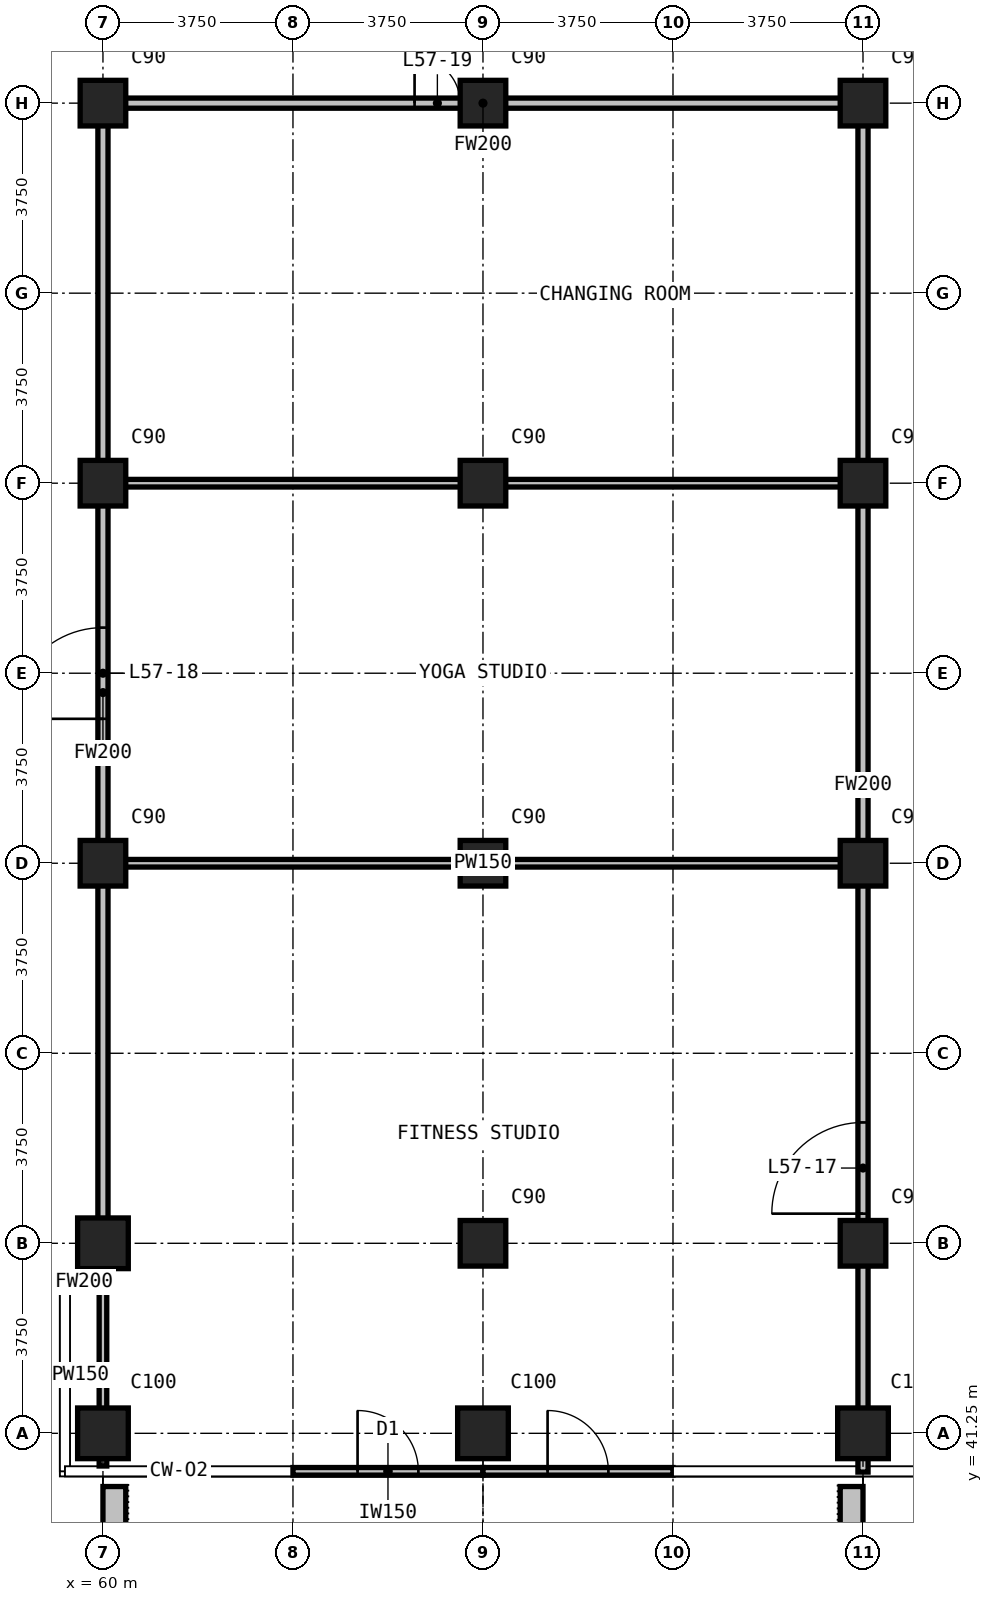
"""IFC4 building model, lengths in metres.
Left out: names, types, materials, properties, quantities, classifications, styles, units other than length and angle.
Written with IfcOpenShell. Run it as: python <this file> out.ifc"""

import sys

from ifc_helpers import new_model, si_unit, direction, frame, frame_2d, origin, origin_2d, place, context, subcontext, project, spatial, rectangle, extrude, element, fill, save


model = new_model("IFC4")
c1 = context("Model", 3, precision=1e-05, world=origin(), true_north=direction((0.0, 1.0)))
c2 = subcontext(c1, "Body", "Model", "MODEL_VIEW")
j1 = project(units=[si_unit("LENGTHUNIT", "METRE"), si_unit("PLANEANGLEUNIT", "RADIAN")], contexts=[c1])
p1 = place(None, origin())
s1 = spatial("IfcSite", under=j1, at=p1, CompositionType="ELEMENT")
p2 = place(p1, origin())
s2 = spatial("IfcBuilding", under=s1, at=p2, CompositionType="ELEMENT")
p3 = place(p2, frame((0.0, 0.0, 221.1)))
s3 = spatial("IfcBuildingStorey", under=s2, at=p3, CompositionType="ELEMENT", Elevation=221.1)
for number, where, z_axis, x_axis in (
    (1, (60.0, 41.25, 0.0), (0.0, 0.0, 1.0), (1.0, 0.0, 0.0)),
    (2, (60.0, 45.0, 0.0), (0.0, 0.0, 1.0), (1.0, 0.0, 0.0)),
):
    element("IfcColumn", number, at=place(p3, frame(where, z_axis=z_axis, x_axis=x_axis)), inside=s3, PredefinedType="COLUMN", context=c2, shape_type="SweptSolid", body=[
        extrude(rectangle(XDim=1.0, YDim=1.0, at=origin_2d()), origin(), (0.0, 0.0, 1.0), 3.6),
    ])
for number, where, z_axis, x_axis in (
    (3, (60.0, 52.5, 0.0), (0.0, 0.0, 1.0), (1.0, 0.0, 0.0)),
    (4, (60.0, 60.0, 0.0), (0.0, 0.0, 1.0), (1.0, 0.0, 0.0)),
    (5, (60.0, 67.5, 0.0), (0.0, 0.0, 1.0), (1.0, 0.0, 0.0)),
):
    element("IfcColumn", number, at=place(p3, frame(where, z_axis=z_axis, x_axis=x_axis)), inside=s3, PredefinedType="COLUMN", context=c2, shape_type="SweptSolid", body=[
        extrude(rectangle(XDim=0.9, YDim=0.9, at=origin_2d()), origin(), (0.0, 0.0, 1.0), 3.6),
    ])
p4 = place(p3, frame((67.5, 41.25, 0.0), z_axis=(0.0, 0.0, 1.0), x_axis=(1.0, 0.0, 0.0)))
e6 = element("IfcColumn", 6, at=p4, inside=s3, PredefinedType="COLUMN", context=c2, shape_type="SweptSolid", body=[
    extrude(rectangle(XDim=1.0, YDim=1.0, at=origin_2d()), origin(), (0.0, 0.0, 1.0), 3.6),
])
for number, where, z_axis, x_axis in (
    (7, (67.5, 45.0, 0.0), (0.0, 0.0, 1.0), (1.0, 0.0, 0.0)),
    (8, (67.5, 52.5, 0.0), (0.0, 0.0, 1.0), (1.0, 0.0, 0.0)),
    (9, (67.5, 60.0, 0.0), (0.0, 0.0, 1.0), (1.0, 0.0, 0.0)),
    (10, (67.5, 67.5, 0.0), (0.0, 0.0, 1.0), (1.0, 0.0, 0.0)),
):
    element("IfcColumn", number, at=place(p3, frame(where, z_axis=z_axis, x_axis=x_axis)), inside=s3, PredefinedType="COLUMN", context=c2, shape_type="SweptSolid", body=[
        extrude(rectangle(XDim=0.9, YDim=0.9, at=origin_2d()), origin(), (0.0, 0.0, 1.0), 3.6),
    ])
p5 = place(p3, frame((75.0, 41.25, 0.0), z_axis=(0.0, 0.0, 1.0), x_axis=(1.0, 0.0, 0.0)))
e11 = element("IfcColumn", 11, at=p5, inside=s3, PredefinedType="COLUMN", context=c2, shape_type="SweptSolid", body=[
    extrude(rectangle(XDim=1.0, YDim=1.0, at=origin_2d()), origin(), (0.0, 0.0, 1.0), 3.6),
])
for number, where, z_axis, x_axis in (
    (12, (75.0, 45.0, 0.0), (0.0, 0.0, 1.0), (1.0, 0.0, 0.0)),
    (13, (75.0, 52.5, 0.0), (0.0, 0.0, 1.0), (1.0, 0.0, 0.0)),
    (14, (75.0, 60.0, 0.0), (0.0, 0.0, 1.0), (1.0, 0.0, 0.0)),
    (15, (75.0, 67.5, 0.0), (0.0, 0.0, 1.0), (1.0, 0.0, 0.0)),
):
    element("IfcColumn", number, at=place(p3, frame(where, z_axis=z_axis, x_axis=x_axis)), inside=s3, PredefinedType="COLUMN", context=c2, shape_type="SweptSolid", body=[
        extrude(rectangle(XDim=0.9, YDim=0.9, at=origin_2d()), origin(), (0.0, 0.0, 1.0), 3.6),
    ])
p6 = place(p3, frame((63.75, 40.5, 0.0), z_axis=(0.0, 0.0, 1.0), x_axis=(1.0, 0.0, 0.0)))
e16 = element("IfcWall", 16, at=p6, inside=s3, PredefinedType="SOLIDWALL", context=c2, shape_type="SweptSolid", body=[
    extrude(rectangle(XDim=3.75, YDim=0.15, at=frame_2d((1.875, 0.0))), origin(), (0.0, 0.0, 1.0), 3.3),
])
p7 = place(p6, frame((1.275, 0.0, 0.0)))
e17 = element("IfcOpeningElement", 17, at=p7, cuts=e16, PredefinedType="OPENING", context=c2, shape_type="SweptSolid", body=[
    extrude(rectangle(XDim=1.2, YDim=2.4, at=frame_2d((0.6, 1.2))), frame((0.0, 0.085, 0.0), z_axis=(0.0, -1.0, 0.0), x_axis=(1.0, 0.0, 0.0)), (0.0, 0.0, 1.0), 0.17),
])
p8 = place(p3, frame((67.5, 40.5, 0.0), z_axis=(0.0, 0.0, 1.0), x_axis=(1.0, 0.0, 0.0)))
e18 = element("IfcWall", 18, at=p8, inside=s3, PredefinedType="SOLIDWALL", context=c2, shape_type="SweptSolid", body=[
    extrude(rectangle(XDim=3.75, YDim=0.15, at=frame_2d((1.875, 0.0))), origin(), (0.0, 0.0, 1.0), 3.3),
])
p9 = place(p8, frame((1.275, 0.0, 0.0)))
e19 = element("IfcOpeningElement", 19, at=p9, cuts=e18, PredefinedType="OPENING", context=c2, shape_type="SweptSolid", body=[
    extrude(rectangle(XDim=1.2, YDim=2.4, at=frame_2d((0.6, 1.2))), frame((0.0, 0.085, 0.0), z_axis=(0.0, -1.0, 0.0), x_axis=(1.0, 0.0, 0.0)), (0.0, 0.0, 1.0), 0.17),
])
for number, where, z_axis, x_axis in (
    (20, (60.225, 40.2, 0.0), (0.0, 0.0, 1.0), (0.0, -1.0, 0.0)),
    (21, (74.775, 40.2, 0.0), (0.0, 0.0, 1.0), (0.0, -1.0, 0.0)),
):
    element("IfcWall", number, at=place(p3, frame(where, z_axis=z_axis, x_axis=x_axis)), inside=s3, PredefinedType="USERDEFINED", context=c2, shape_type="SweptSolid", body=[
        extrude(rectangle(XDim=2.35, YDim=0.45, at=frame_2d((1.175, 0.0))), origin(), (0.0, 0.0, 1.0), 1.1),
    ])
p10 = place(p3, frame((59.355, 44.235, 0.0), z_axis=(0.0, 0.0, 1.0), x_axis=(1.0, 0.0, 0.0)))
e22 = element("IfcWall", 22, at=p10, inside=s3, PredefinedType="PARTITIONING", context=c2, shape_type="SweptSolid", body=[
    extrude(rectangle(XDim=0.545, YDim=0.2, at=frame_2d((0.272, 0.0))), origin(), (0.0, 0.0, 1.0), 3.3),
])
p11 = place(p3, frame((60.1, 67.5, 0.0), z_axis=(0.0, 0.0, 1.0), x_axis=(1.0, 0.0, 0.0)))
e23 = element("IfcWall", 23, at=p11, inside=s3, PredefinedType="PARTITIONING", context=c2, shape_type="SweptSolid", body=[
    extrude(rectangle(XDim=14.8, YDim=0.2, at=frame_2d((7.4, 0.0))), origin(), (0.0, 0.0, 1.0), 3.3),
])
p12 = place(p11, frame((6.05, 0.0, 0.0)))
e24 = element("IfcOpeningElement", 24, at=p12, cuts=e23, PredefinedType="OPENING", context=c2, shape_type="SweptSolid", body=[
    extrude(rectangle(XDim=0.9, YDim=2.2, at=frame_2d((0.45, 1.1))), frame((0.0, 0.11, 0.0), z_axis=(0.0, -1.0, 0.0), x_axis=(1.0, 0.0, 0.0)), (0.0, 0.0, 1.0), 0.22),
])
p13 = place(p3, frame((60.0, 44.135, 0.0), z_axis=(0.0, 0.0, 1.0), x_axis=(0.0, 1.0, 0.0)))
e25 = element("IfcWall", 25, at=p13, inside=s3, PredefinedType="PARTITIONING", context=c2, shape_type="SweptSolid", body=[
    extrude(rectangle(XDim=23.465, YDim=0.2, at=frame_2d((11.732, 0.0))), origin(), (0.0, 0.0, 1.0), 3.3),
])
p14 = place(p13, frame((11.215, 0.0, 0.0)))
e26 = element("IfcOpeningElement", 26, at=p14, cuts=e25, PredefinedType="OPENING", context=c2, shape_type="SweptSolid", body=[
    extrude(rectangle(XDim=1.8, YDim=2.2, at=frame_2d((0.9, 1.1))), frame((0.0, 0.11, 0.0), z_axis=(0.0, -1.0, 0.0), x_axis=(1.0, 0.0, 0.0)), (0.0, 0.0, 1.0), 0.22),
])
p15 = place(p3, frame((75.0, 40.485, 0.0), z_axis=(0.0, 0.0, 1.0), x_axis=(0.0, 1.0, 0.0)))
e27 = element("IfcWall", 27, at=p15, inside=s3, PredefinedType="PARTITIONING", context=c2, shape_type="SweptSolid", body=[
    extrude(rectangle(XDim=27.115, YDim=0.2, at=frame_2d((13.558, 0.0))), origin(), (0.0, 0.0, 1.0), 3.3),
])
p16 = place(p15, frame((5.1, 0.0, 0.0)))
e28 = element("IfcOpeningElement", 28, at=p16, cuts=e27, PredefinedType="OPENING", context=c2, shape_type="SweptSolid", body=[
    extrude(rectangle(XDim=1.8, YDim=2.2, at=frame_2d((0.9, 1.1))), frame((0.0, 0.11, 0.0), z_axis=(0.0, -1.0, 0.0), x_axis=(1.0, 0.0, 0.0)), (0.0, 0.0, 1.0), 0.22),
])
for number, where, z_axis, x_axis in (
    (29, (60.1, 52.5, 0.0), (0.0, 0.0, 1.0), (1.0, 0.0, 0.0)),
    (30, (60.1, 60.0, 0.0), (0.0, 0.0, 1.0), (1.0, 0.0, 0.0)),
):
    element("IfcWall", number, at=place(p3, frame(where, z_axis=z_axis, x_axis=x_axis)), inside=s3, PredefinedType="PARTITIONING", context=c2, shape_type="SweptSolid", body=[
        extrude(rectangle(XDim=14.8, YDim=0.15, at=frame_2d((7.4, 0.0))), origin(), (0.0, 0.0, 1.0), 3.3),
    ])
p17 = place(p3, frame((60.0, 40.605, 0.0), z_axis=(0.0, 0.0, 1.0), x_axis=(0.0, 1.0, 0.0)))
e31 = element("IfcWall", 31, at=p17, inside=s3, PredefinedType="PARTITIONING", context=c2, shape_type="SweptSolid", body=[
    extrude(rectangle(XDim=3.6, YDim=0.15, at=frame_2d((1.8, 0.0))), origin(), (0.0, 0.0, 1.0), 3.3),
])
p18 = place(p7, origin())
e32 = element("IfcDoor", 32, at=p18, inside=s3, OperationType="SINGLE_SWING_LEFT", PredefinedType="DOOR", context=c2, shape_type="SweptSolid", body=[
    extrude(rectangle(XDim=1.2, YDim=2.4, at=frame_2d((0.6, 1.2))), frame((0.0, 0.025, 0.0), z_axis=(0.0, -1.0, 0.0), x_axis=(1.0, 0.0, 0.0)), (0.0, 0.0, 1.0), 0.05),
])
fill(e17, e32)
p19 = place(p9, origin())
e33 = element("IfcDoor", 33, at=p19, inside=s3, OperationType="SINGLE_SWING_LEFT", PredefinedType="DOOR", context=c2, shape_type="SweptSolid", body=[
    extrude(rectangle(XDim=1.2, YDim=2.4, at=frame_2d((0.6, 1.2))), frame((0.0, 0.025, 0.0), z_axis=(0.0, -1.0, 0.0), x_axis=(1.0, 0.0, 0.0)), (0.0, 0.0, 1.0), 0.05),
])
fill(e19, e33)
p20 = place(p16, origin())
e34 = element("IfcDoor", 34, at=p20, inside=s3, OperationType="DOUBLE_DOOR_SINGLE_SWING", PredefinedType="DOOR", context=c2, shape_type="SweptSolid", body=[
    extrude(rectangle(XDim=1.8, YDim=2.2, at=frame_2d((0.9, 1.1))), frame((0.0, 0.025, 0.0), z_axis=(0.0, -1.0, 0.0), x_axis=(1.0, 0.0, 0.0)), (0.0, 0.0, 1.0), 0.05),
])
fill(e28, e34)
p21 = place(p14, origin())
e35 = element("IfcDoor", 35, at=p21, inside=s3, OperationType="DOUBLE_DOOR_SINGLE_SWING", PredefinedType="DOOR", context=c2, shape_type="SweptSolid", body=[
    extrude(rectangle(XDim=1.8, YDim=2.2, at=frame_2d((0.9, 1.1))), frame((0.0, 0.025, 0.0), z_axis=(0.0, -1.0, 0.0), x_axis=(1.0, 0.0, 0.0)), (0.0, 0.0, 1.0), 0.05),
])
fill(e26, e35)
p22 = place(p12, origin())
e36 = element("IfcDoor", 36, at=p22, inside=s3, OperationType="SINGLE_SWING_LEFT", PredefinedType="DOOR", context=c2, shape_type="SweptSolid", body=[
    extrude(rectangle(XDim=0.9, YDim=2.2, at=frame_2d((0.45, 1.1))), frame((0.0, 0.025, 0.0), z_axis=(0.0, -1.0, 0.0), x_axis=(1.0, 0.0, 0.0)), (0.0, 0.0, 1.0), 0.05),
])
fill(e24, e36)
save(model, sys.argv[1])
